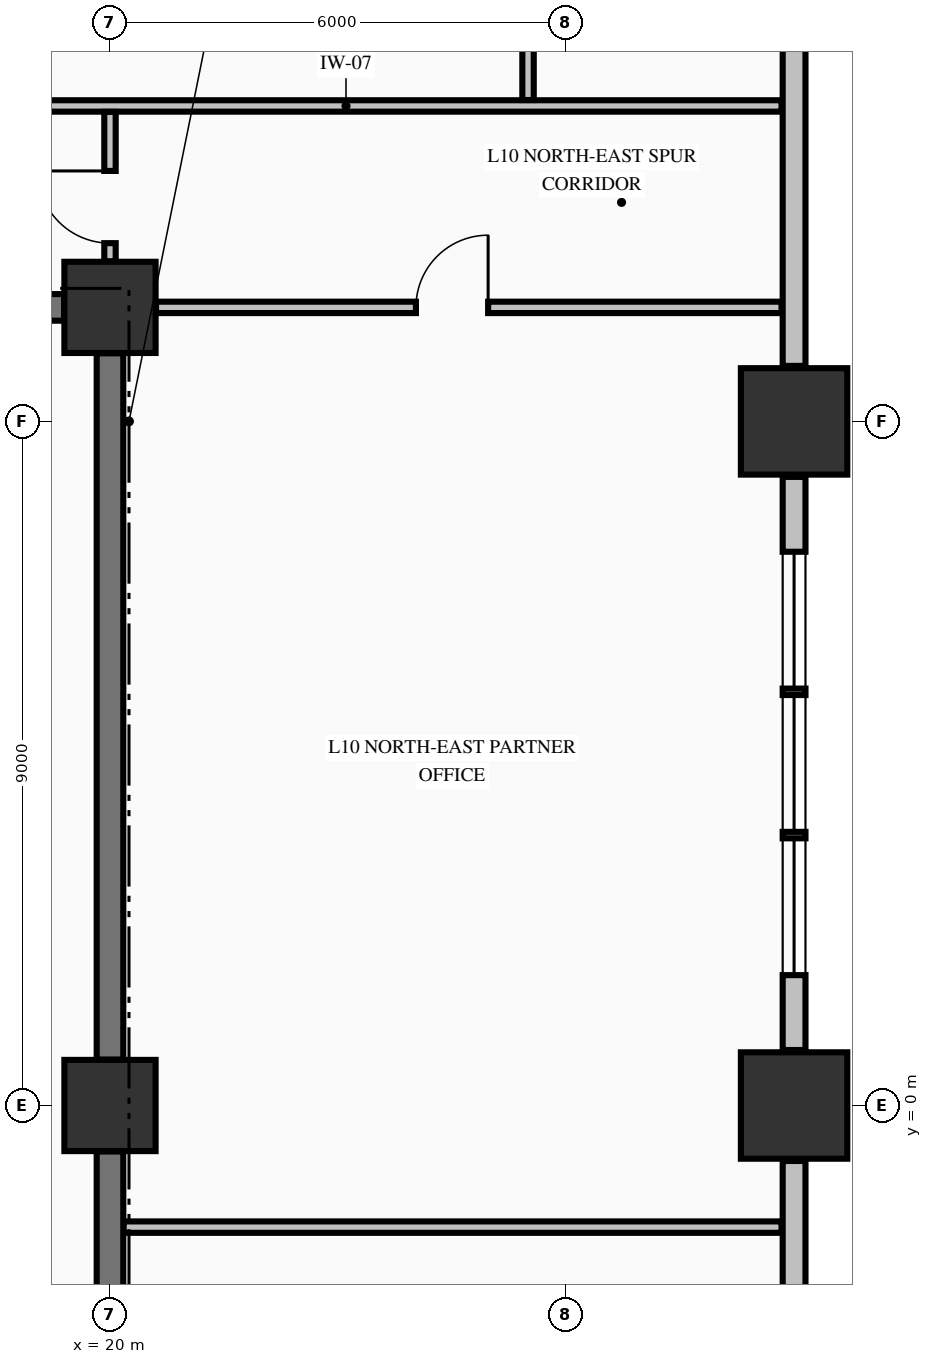
"""IFC4 building model, lengths in metres.
Left out: names, types, materials, properties, quantities, classifications, styles, units other than length and angle.
Written with IfcOpenShell. Run it as: python <this file> out.ifc"""

import sys

from ifc_helpers import new_model, si_unit, direction, frame, frame_2d, origin, origin_2d, place, context, subcontext, project, spatial, rectangle, extrude, element, fill, save


model = new_model("IFC4")
c1 = context("Model", 3, precision=1e-05, world=origin(), true_north=direction((0.0, 1.0)))
c2 = subcontext(c1, "Body", "Model", "MODEL_VIEW")
j1 = project(units=[si_unit("LENGTHUNIT", "METRE"), si_unit("PLANEANGLEUNIT", "RADIAN")], contexts=[c1])
p1 = place(None, origin())
s1 = spatial("IfcSite", under=j1, at=p1, CompositionType="ELEMENT")
p2 = place(p1, origin())
s2 = spatial("IfcBuilding", under=s1, at=p2, CompositionType="ELEMENT")
p3 = place(p2, frame((0.0, 0.0, 45.05)))
s3 = spatial("IfcBuildingStorey", under=s2, at=p3, CompositionType="ELEMENT", Elevation=45.05)
for number, where, z_axis, x_axis in (
    (1, (29.0, 0.0, -0.25), (0.0, 0.0, 1.0), (1.0, 0.0, 0.0)),
    (2, (29.0, 9.0, -0.25), (0.0, 0.0, 1.0), (1.0, 0.0, 0.0)),
):
    element("IfcColumn", number, at=place(p3, frame(where, z_axis=z_axis, x_axis=x_axis)), inside=s3, PredefinedType="COLUMN", context=c2, shape_type="SweptSolid", body=[
        extrude(rectangle(XDim=1.4, YDim=1.4, at=origin_2d()), origin(), (0.0, 0.0, 1.0), 3.57),
    ])
for number, where, z_axis, x_axis in (
    (3, (20.0, 10.5, -0.25), (0.0, 0.0, 1.0), (1.0, 0.0, 0.0)),
    (4, (20.0, 0.0, -0.25), (0.0, 0.0, 1.0), (1.0, 0.0, 0.0)),
):
    element("IfcColumn", number, at=place(p3, frame(where, z_axis=z_axis, x_axis=x_axis)), inside=s3, PredefinedType="COLUMN", context=c2, shape_type="SweptSolid", body=[
        extrude(rectangle(XDim=1.2, YDim=1.2, at=origin_2d()), origin(), (0.0, 0.0, 1.0), 3.57),
    ])
p4 = place(p3, frame((29.0, -8.27, 0.0), z_axis=(0.0, 0.0, 1.0), x_axis=(0.0, 1.0, 0.0)))
e5 = element("IfcWall", 5, at=p4, inside=s3, PredefinedType="STANDARD", context=c2, shape_type="SweptSolid", body=[
    extrude(rectangle(XDim=7.54, YDim=0.3, at=frame_2d((3.77, 0.0))), origin(), (0.0, 0.0, 1.0), 2.712),
])
p5 = place(p4, frame((0.985, 0.0, 0.78)))
e6 = element("IfcOpeningElement", 6, at=p5, cuts=e5, PredefinedType="OPENING", context=c2, shape_type="SweptSolid", body=[
    extrude(rectangle(XDim=1.8, YDim=1.72, at=frame_2d((0.9, 0.86))), frame((0.0, 0.16, 0.0), z_axis=(0.0, -1.0, 0.0), x_axis=(1.0, 0.0, 0.0)), (0.0, 0.0, 1.0), 0.32),
])
p6 = place(p4, frame((2.87, 0.0, 0.78)))
e7 = element("IfcOpeningElement", 7, at=p6, cuts=e5, PredefinedType="OPENING", context=c2, shape_type="SweptSolid", body=[
    extrude(rectangle(XDim=1.8, YDim=1.72, at=frame_2d((0.9, 0.86))), frame((0.0, 0.16, 0.0), z_axis=(0.0, -1.0, 0.0), x_axis=(1.0, 0.0, 0.0)), (0.0, 0.0, 1.0), 0.32),
])
p7 = place(p3, frame((29.0, 0.73, 0.0), z_axis=(0.0, 0.0, 1.0), x_axis=(0.0, 1.0, 0.0)))
e8 = element("IfcWall", 8, at=p7, inside=s3, PredefinedType="STANDARD", context=c2, shape_type="SweptSolid", body=[
    extrude(rectangle(XDim=7.54, YDim=0.3, at=frame_2d((3.77, 0.0))), origin(), (0.0, 0.0, 1.0), 2.712),
])
p8 = place(p7, frame((0.985, 0.0, 0.78)))
e9 = element("IfcOpeningElement", 9, at=p8, cuts=e8, PredefinedType="OPENING", context=c2, shape_type="SweptSolid", body=[
    extrude(rectangle(XDim=1.8, YDim=1.72, at=frame_2d((0.9, 0.86))), frame((0.0, 0.16, 0.0), z_axis=(0.0, -1.0, 0.0), x_axis=(1.0, 0.0, 0.0)), (0.0, 0.0, 1.0), 0.32),
])
p9 = place(p7, frame((2.87, 0.0, 0.78)))
e10 = element("IfcOpeningElement", 10, at=p9, cuts=e8, PredefinedType="OPENING", context=c2, shape_type="SweptSolid", body=[
    extrude(rectangle(XDim=1.8, YDim=1.72, at=frame_2d((0.9, 0.86))), frame((0.0, 0.16, 0.0), z_axis=(0.0, -1.0, 0.0), x_axis=(1.0, 0.0, 0.0)), (0.0, 0.0, 1.0), 0.32),
])
p10 = place(p7, frame((4.755, 0.0, 0.78)))
e11 = element("IfcOpeningElement", 11, at=p10, cuts=e8, PredefinedType="OPENING", context=c2, shape_type="SweptSolid", body=[
    extrude(rectangle(XDim=1.8, YDim=1.72, at=frame_2d((0.9, 0.86))), frame((0.0, 0.16, 0.0), z_axis=(0.0, -1.0, 0.0), x_axis=(1.0, 0.0, 0.0)), (0.0, 0.0, 1.0), 0.32),
])
p11 = place(p3, frame((29.0, 9.73, 0.0), z_axis=(0.0, 0.0, 1.0), x_axis=(0.0, 1.0, 0.0)))
e12 = element("IfcWall", 12, at=p11, inside=s3, PredefinedType="STANDARD", context=c2, shape_type="SweptSolid", body=[
    extrude(rectangle(XDim=12.54, YDim=0.3, at=frame_2d((6.27, 0.0))), origin(), (0.0, 0.0, 1.0), 2.712),
])
p12 = place(p3, frame((14.7, 10.5, 0.0), z_axis=(0.0, 0.0, 1.0), x_axis=(1.0, 0.0, 0.0)))
e13 = element("IfcWall", 13, at=p12, inside=s3, PredefinedType="SHEAR", context=c2, shape_type="SweptSolid", body=[
    extrude(rectangle(XDim=4.696, YDim=0.35, at=frame_2d((2.348, 0.0))), origin(), (0.0, 0.0, 1.0), 3.32),
])
p13 = place(p12, frame((2.125, 0.0, 0.0)))
e14 = element("IfcOpeningElement", 14, at=p13, cuts=e13, PredefinedType="OPENING", context=c2, shape_type="SweptSolid", body=[
    extrude(rectangle(XDim=1.05, YDim=2.15, at=frame_2d((0.525, 1.075))), frame((0.0, 0.185, 0.0), z_axis=(0.0, -1.0, 0.0), x_axis=(1.0, 0.0, 0.0)), (0.0, 0.0, 1.0), 0.37),
])
p14 = place(p3, frame((20.178, -1.6, 0.0), z_axis=(0.0, 0.0, 1.0), x_axis=(1.0, 0.0, 0.0)))
e15 = element("IfcWall", 15, at=p14, inside=s3, PredefinedType="PARTITIONING", context=c2, shape_type="SweptSolid", body=[
    extrude(rectangle(XDim=8.657, YDim=0.15, at=frame_2d((4.329, 0.0))), origin(), (0.0, 0.0, 1.0), 3.32),
])
p15 = place(p3, frame((20.606, 10.5, 0.0), z_axis=(0.0, 0.0, 1.0), x_axis=(1.0, 0.0, 0.0)))
e16 = element("IfcWall", 16, at=p15, inside=s3, PredefinedType="PARTITIONING", context=c2, shape_type="SweptSolid", body=[
    extrude(rectangle(XDim=8.229, YDim=0.15, at=frame_2d((4.115, 0.0))), origin(), (0.0, 0.0, 1.0), 3.32),
])
p16 = place(p15, frame((3.419, 0.0, 0.0)))
e17 = element("IfcOpeningElement", 17, at=p16, cuts=e16, PredefinedType="OPENING", context=c2, shape_type="SweptSolid", body=[
    extrude(rectangle(XDim=0.95, YDim=2.15, at=frame_2d((0.475, 1.075))), frame((0.0, 0.085, 0.0), z_axis=(0.0, -1.0, 0.0), x_axis=(1.0, 0.0, 0.0)), (0.0, 0.0, 1.0), 0.17),
])
p17 = place(p3, frame((-23.835, 13.15, 0.0), z_axis=(0.0, 0.0, 1.0), x_axis=(1.0, 0.0, 0.0)))
e18 = element("IfcWall", 18, at=p17, inside=s3, PredefinedType="PARTITIONING", context=c2, shape_type="SweptSolid", body=[
    extrude(rectangle(XDim=52.67, YDim=0.15, at=frame_2d((26.335, 0.0))), origin(), (0.0, 0.0, 1.0), 3.32),
])
p18 = place(p17, frame((8.56, 0.0, 0.0)))
e19 = element("IfcOpeningElement", 19, at=p18, cuts=e18, PredefinedType="OPENING", context=c2, shape_type="SweptSolid", body=[
    extrude(rectangle(XDim=1.05, YDim=2.15, at=frame_2d((0.525, 1.075))), frame((0.0, 0.085, 0.0), z_axis=(0.0, -1.0, 0.0), x_axis=(1.0, 0.0, 0.0)), (0.0, 0.0, 1.0), 0.17),
])
p19 = place(p17, frame((16.56, 0.0, 0.0)))
e20 = element("IfcOpeningElement", 20, at=p19, cuts=e18, PredefinedType="OPENING", context=c2, shape_type="SweptSolid", body=[
    extrude(rectangle(XDim=0.95, YDim=2.15, at=frame_2d((0.475, 1.075))), frame((0.0, 0.085, 0.0), z_axis=(0.0, -1.0, 0.0), x_axis=(1.0, 0.0, 0.0)), (0.0, 0.0, 1.0), 0.17),
])
p20 = place(p17, frame((23.81, 0.0, 0.0)))
e21 = element("IfcOpeningElement", 21, at=p20, cuts=e18, PredefinedType="OPENING", context=c2, shape_type="SweptSolid", body=[
    extrude(rectangle(XDim=0.95, YDim=2.15, at=frame_2d((0.475, 1.075))), frame((0.0, 0.085, 0.0), z_axis=(0.0, -1.0, 0.0), x_axis=(1.0, 0.0, 0.0)), (0.0, 0.0, 1.0), 0.17),
])
p21 = place(p17, frame((28.36, 0.0, 0.0)))
e22 = element("IfcOpeningElement", 22, at=p21, cuts=e18, PredefinedType="OPENING", context=c2, shape_type="SweptSolid", body=[
    extrude(rectangle(XDim=0.95, YDim=2.15, at=frame_2d((0.475, 1.075))), frame((0.0, 0.085, 0.0), z_axis=(0.0, -1.0, 0.0), x_axis=(1.0, 0.0, 0.0)), (0.0, 0.0, 1.0), 0.17),
])
p22 = place(p17, frame((35.61, 0.0, 0.0)))
e23 = element("IfcOpeningElement", 23, at=p22, cuts=e18, PredefinedType="OPENING", context=c2, shape_type="SweptSolid", body=[
    extrude(rectangle(XDim=0.95, YDim=2.15, at=frame_2d((0.475, 1.075))), frame((0.0, 0.085, 0.0), z_axis=(0.0, -1.0, 0.0), x_axis=(1.0, 0.0, 0.0)), (0.0, 0.0, 1.0), 0.17),
])
p23 = place(p17, frame((40.16, 0.0, 0.0)))
e24 = element("IfcOpeningElement", 24, at=p23, cuts=e18, PredefinedType="OPENING", context=c2, shape_type="SweptSolid", body=[
    extrude(rectangle(XDim=1.05, YDim=2.15, at=frame_2d((0.525, 1.075))), frame((0.0, 0.085, 0.0), z_axis=(0.0, -1.0, 0.0), x_axis=(1.0, 0.0, 0.0)), (0.0, 0.0, 1.0), 0.17),
])
p24 = place(p3, frame((20.0, -4.423, 0.0), z_axis=(0.0, 0.0, 1.0), x_axis=(0.0, 1.0, 0.0)))
e25 = element("IfcWall", 25, at=p24, inside=s3, PredefinedType="SHEAR", context=c2, shape_type="SweptSolid", body=[
    extrude(rectangle(XDim=3.819, YDim=0.35, at=frame_2d((1.91, 0.0))), origin(), (0.0, 0.0, 1.0), 3.32),
])
p25 = place(p3, frame((20.0, 0.604, 0.0), z_axis=(0.0, 0.0, 1.0), x_axis=(0.0, 1.0, 0.0)))
e26 = element("IfcWall", 26, at=p25, inside=s3, PredefinedType="SHEAR", context=c2, shape_type="SweptSolid", body=[
    extrude(rectangle(XDim=9.292, YDim=0.35, at=frame_2d((4.646, 0.0))), origin(), (0.0, 0.0, 1.0), 3.32),
])
p26 = place(p3, frame((20.0, 11.106, 0.0), z_axis=(0.0, 0.0, 1.0), x_axis=(0.0, 1.0, 0.0)))
e27 = element("IfcWall", 27, at=p26, inside=s3, PredefinedType="PARTITIONING", context=c2, shape_type="SweptSolid", body=[
    extrude(rectangle(XDim=1.966, YDim=0.15, at=frame_2d((0.983, 0.0))), origin(), (0.0, 0.0, 1.0), 2.66),
])
p27 = place(p26, frame((0.239, 0.0, 0.0)))
e28 = element("IfcOpeningElement", 28, at=p27, cuts=e27, PredefinedType="OPENING", context=c2, shape_type="SweptSolid", body=[
    extrude(rectangle(XDim=0.95, YDim=2.15, at=frame_2d((0.475, 1.075))), frame((0.0, 0.085, 0.0), z_axis=(0.0, -1.0, 0.0), x_axis=(1.0, 0.0, 0.0)), (0.0, 0.0, 1.0), 0.17),
])
p28 = place(p3, frame((25.5, 13.228, 0.0), z_axis=(0.0, 0.0, 1.0), x_axis=(0.0, 1.0, 0.0)))
e29 = element("IfcWall", 29, at=p28, inside=s3, PredefinedType="PARTITIONING", context=c2, shape_type="SweptSolid", body=[
    extrude(rectangle(XDim=9.066, YDim=0.15, at=frame_2d((4.533, 0.0))), origin(), (0.0, 0.0, 1.0), 3.32),
])
p29 = place(p8, origin())
e30 = element("IfcWindow", 30, at=p29, inside=s3, PartitioningType="SINGLE_PANEL", PredefinedType="WINDOW", context=c2, shape_type="SweptSolid", body=[
    extrude(rectangle(XDim=1.8, YDim=1.72, at=frame_2d((0.9, 0.86))), frame((0.0, 0.03, 0.0), z_axis=(0.0, -1.0, 0.0), x_axis=(1.0, 0.0, 0.0)), (0.0, 0.0, 1.0), 0.06),
])
fill(e9, e30)
p30 = place(p9, origin())
e31 = element("IfcWindow", 31, at=p30, inside=s3, PartitioningType="SINGLE_PANEL", PredefinedType="WINDOW", context=c2, shape_type="SweptSolid", body=[
    extrude(rectangle(XDim=1.8, YDim=1.72, at=frame_2d((0.9, 0.86))), frame((0.0, 0.03, 0.0), z_axis=(0.0, -1.0, 0.0), x_axis=(1.0, 0.0, 0.0)), (0.0, 0.0, 1.0), 0.06),
])
fill(e10, e31)
p31 = place(p10, origin())
e32 = element("IfcWindow", 32, at=p31, inside=s3, PartitioningType="SINGLE_PANEL", PredefinedType="WINDOW", context=c2, shape_type="SweptSolid", body=[
    extrude(rectangle(XDim=1.8, YDim=1.72, at=frame_2d((0.9, 0.86))), frame((0.0, 0.03, 0.0), z_axis=(0.0, -1.0, 0.0), x_axis=(1.0, 0.0, 0.0)), (0.0, 0.0, 1.0), 0.06),
])
fill(e11, e32)
p32 = place(p27, origin())
e33 = element("IfcDoor", 33, at=p32, inside=s3, OperationType="SINGLE_SWING_RIGHT", PredefinedType="DOOR", context=c2, shape_type="SweptSolid", body=[
    extrude(rectangle(XDim=0.95, YDim=2.15, at=frame_2d((0.475, 1.075))), frame((0.0, 0.025, 0.0), z_axis=(0.0, -1.0, 0.0), x_axis=(1.0, 0.0, 0.0)), (0.0, 0.0, 1.0), 0.05),
])
fill(e28, e33)
p33 = place(p16, origin())
e34 = element("IfcDoor", 34, at=p33, inside=s3, OperationType="SINGLE_SWING_RIGHT", PredefinedType="DOOR", context=c2, shape_type="SweptSolid", body=[
    extrude(rectangle(XDim=0.95, YDim=2.15, at=frame_2d((0.475, 1.075))), frame((0.0, 0.025, 0.0), z_axis=(0.0, -1.0, 0.0), x_axis=(1.0, 0.0, 0.0)), (0.0, 0.0, 1.0), 0.05),
])
fill(e17, e34)
save(model, sys.argv[1])
